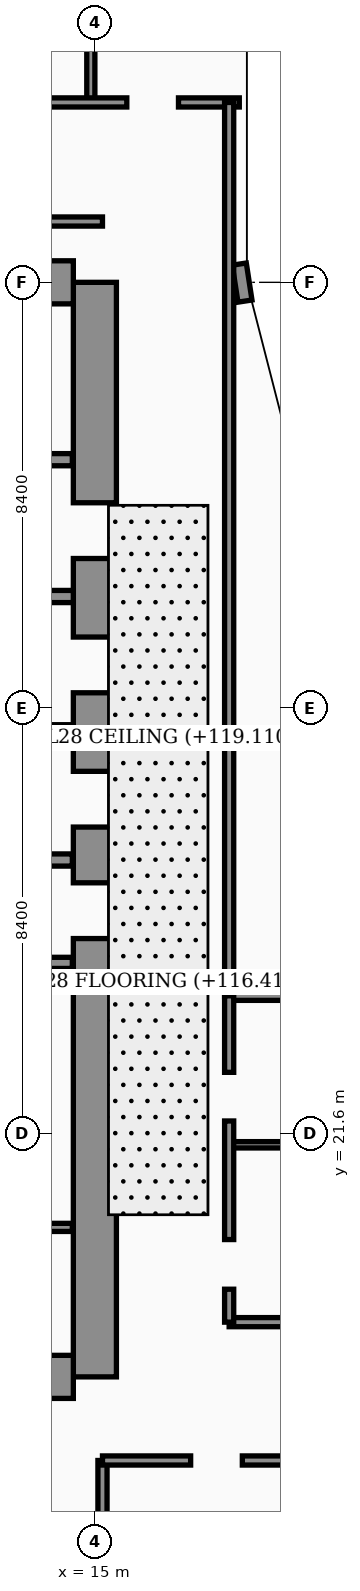
"""IFC4 building model, lengths in metres.
Left out: names, types, materials, properties, quantities, classifications, styles, units other than length and angle.
Written with IfcOpenShell. Run it as: python <this file> out.ifc"""

import sys

from ifc_helpers import new_model, si_unit, direction, frame, frame_2d, origin, place, context, subcontext, project, spatial, rectangle, extrude, element, fill, save


model = new_model("IFC4")
c1 = context("Model", 3, precision=1e-05, world=origin(), true_north=direction((0.0, 1.0)))
c2 = subcontext(c1, "Body", "Model", "MODEL_VIEW")
j1 = project(units=[si_unit("LENGTHUNIT", "METRE"), si_unit("PLANEANGLEUNIT", "RADIAN")], contexts=[c1])
p1 = place(None, origin())
s1 = spatial("IfcSite", under=j1, at=p1, CompositionType="ELEMENT")
p2 = place(p1, origin())
s2 = spatial("IfcBuilding", under=s1, at=p2, CompositionType="ELEMENT")
p3 = place(p2, frame((0.0, 0.0, 116.4)))
s3 = spatial("IfcBuildingStorey", under=s2, at=p3, CompositionType="ELEMENT", Elevation=116.4)
p4 = place(p3, frame((15.0, 16.8, 0.0), z_axis=(0.0, 0.0, 1.0), x_axis=(0.0, 1.0, 0.0)))
e1 = element("IfcWall", 1, at=p4, inside=s3, PredefinedType="SHEAR", context=c2, shape_type="SweptSolid", body=[
    extrude(rectangle(XDim=21.6, YDim=0.85, at=frame_2d((10.8, 0.0))), origin(), (0.0, 0.0, 1.0), 3.56),
])
p5 = place(p4, frame((8.65, 0.0, 0.0)))
e2 = element("IfcOpeningElement", 2, at=p5, cuts=e1, PredefinedType="OPENING", context=c2, shape_type="SweptSolid", body=[
    extrude(rectangle(XDim=1.1, YDim=2.2, at=frame_2d((0.55, 1.1))), frame((0.0, 0.435, 0.0), z_axis=(0.0, -1.0, 0.0), x_axis=(1.0, 0.0, 0.0)), (0.0, 0.0, 1.0), 0.87),
])
p6 = place(p4, frame((10.85, 0.0, 0.0)))
e3 = element("IfcOpeningElement", 3, at=p6, cuts=e1, PredefinedType="OPENING", context=c2, shape_type="SweptSolid", body=[
    extrude(rectangle(XDim=1.1, YDim=2.2, at=frame_2d((0.55, 1.1))), frame((0.0, 0.435, 0.0), z_axis=(0.0, -1.0, 0.0), x_axis=(1.0, 0.0, 0.0)), (0.0, 0.0, 1.0), 0.87),
])
p7 = place(p4, frame((13.5, 0.0, 0.0)))
e4 = element("IfcOpeningElement", 4, at=p7, cuts=e1, PredefinedType="OPENING", context=c2, shape_type="SweptSolid", body=[
    extrude(rectangle(XDim=1.1, YDim=2.2, at=frame_2d((0.55, 1.1))), frame((0.0, 0.435, 0.0), z_axis=(0.0, -1.0, 0.0), x_axis=(1.0, 0.0, 0.0)), (0.0, 0.0, 1.0), 0.87),
])
p8 = place(p4, frame((16.15, 0.0, 0.0)))
e5 = element("IfcOpeningElement", 5, at=p8, cuts=e1, PredefinedType="OPENING", context=c2, shape_type="SweptSolid", body=[
    extrude(rectangle(XDim=1.1, YDim=2.2, at=frame_2d((0.55, 1.1))), frame((0.0, 0.435, 0.0), z_axis=(0.0, -1.0, 0.0), x_axis=(1.0, 0.0, 0.0)), (0.0, 0.0, 1.0), 0.87),
])
for number, where, z_axis, x_axis in (
    (6, (4.625, 38.4, 0.0), (0.0, 0.0, 1.0), (1.0, 0.0, 0.0)),
    (7, (4.625, 16.8, 0.0), (0.0, 0.0, 1.0), (1.0, 0.0, 0.0)),
):
    element("IfcWall", number, at=place(p3, frame(where, z_axis=z_axis, x_axis=x_axis)), inside=s3, PredefinedType="SHEAR", context=c2, shape_type="SweptSolid", body=[
        extrude(rectangle(XDim=9.95, YDim=0.85, at=frame_2d((4.975, 0.0))), origin(), (0.0, 0.0, 1.0), 3.56),
    ])
for number, where, z_axis, x_axis in (
    (8, (12.18, 29.55, 0.0), (0.0, 0.0, 1.0), (1.0, 0.0, 0.0)),
    (9, (12.18, 32.2, 0.0), (0.0, 0.0, 1.0), (1.0, 0.0, 0.0)),
):
    element("IfcWall", number, at=place(p3, frame(where, z_axis=z_axis, x_axis=x_axis)), inside=s3, PredefinedType="SOLIDWALL", context=c2, shape_type="SweptSolid", body=[
        extrude(rectangle(XDim=2.395, YDim=0.24, at=frame_2d((1.198, 0.0))), origin(), (0.0, 0.0, 1.0), 3.56),
    ])
p9 = place(p3, frame((17.962, 38.03, 0.0), z_axis=(0.0, 0.0, 1.0), x_axis=(-0.15141125477, 0.988470855377, 0.0)))
e10 = element("IfcWall", 10, at=p9, inside=s3, PredefinedType="SOLIDWALL", context=c2, shape_type="SweptSolid", body=[
    extrude(rectangle(XDim=0.739, YDim=0.28, at=frame_2d((0.369, 0.0))), origin(), (0.0, 0.0, 1.0), 3.56),
])
p10 = place(p3, frame((9.68, 19.75, 0.0), z_axis=(0.0, 0.0, 1.0), x_axis=(1.0, 0.0, 0.0)))
e11 = element("IfcWall", 11, at=p10, inside=s3, PredefinedType="PARTITIONING", context=c2, shape_type="SweptSolid", body=[
    extrude(rectangle(XDim=4.875, YDim=0.16, at=frame_2d((2.438, 0.0))), origin(), (0.0, 0.0, 1.0), 3.56),
])
p11 = place(p10, frame((1.1, 0.0, 0.0)))
e12 = element("IfcOpeningElement", 12, at=p11, cuts=e11, PredefinedType="OPENING", context=c2, shape_type="SweptSolid", body=[
    extrude(rectangle(XDim=0.98, YDim=2.15, at=frame_2d((0.49, 1.075))), frame((0.0, 0.09, 0.0), z_axis=(0.0, -1.0, 0.0), x_axis=(1.0, 0.0, 0.0)), (0.0, 0.0, 1.0), 0.18),
])
p12 = place(p3, frame((9.68, 24.97, 0.0), z_axis=(0.0, 0.0, 1.0), x_axis=(1.0, 0.0, 0.0)))
e13 = element("IfcWall", 13, at=p12, inside=s3, PredefinedType="SOLIDWALL", context=c2, shape_type="SweptSolid", body=[
    extrude(rectangle(XDim=4.875, YDim=0.22, at=frame_2d((2.438, 0.0))), origin(), (0.0, 0.0, 1.0), 2.84),
])
p13 = place(p12, frame((0.9, 0.0, 0.0)))
e14 = element("IfcOpeningElement", 14, at=p13, cuts=e13, PredefinedType="OPENING", context=c2, shape_type="SweptSolid", body=[
    extrude(rectangle(XDim=0.98, YDim=2.15, at=frame_2d((0.49, 1.075))), frame((0.0, 0.12, 0.0), z_axis=(0.0, -1.0, 0.0), x_axis=(1.0, 0.0, 0.0)), (0.0, 0.0, 1.0), 0.24),
])
p14 = place(p3, frame((12.25, 27.0, 0.0), z_axis=(0.0, 0.0, 1.0), x_axis=(1.0, 0.0, 0.0)))
e15 = element("IfcWall", 15, at=p14, inside=s3, PredefinedType="SOLIDWALL", context=c2, shape_type="SweptSolid", body=[
    extrude(rectangle(XDim=2.305, YDim=0.24, at=frame_2d((1.152, 0.0))), origin(), (0.0, 0.0, 1.0), 3.56),
])
p15 = place(p3, frame((9.66, 34.9, 0.0), z_axis=(0.0, 0.0, 1.0), x_axis=(1.0, 0.0, 0.0)))
e16 = element("IfcWall", 16, at=p15, inside=s3, PredefinedType="SOLIDWALL", context=c2, shape_type="SweptSolid", body=[
    extrude(rectangle(XDim=4.895, YDim=0.24, at=frame_2d((2.448, 0.0))), origin(), (0.0, 0.0, 1.0), 3.56),
])
p16 = place(p3, frame((15.15, 2.44, 0.0), z_axis=(0.0, 0.0, 1.0), x_axis=(0.0, 1.0, 0.0)))
e17 = element("IfcWall", 17, at=p16, inside=s3, PredefinedType="PARTITIONING", context=c2, shape_type="SweptSolid", body=[
    extrude(rectangle(XDim=12.71, YDim=0.18, at=frame_2d((6.355, 0.0))), origin(), (0.0, 0.0, 1.0), 3.04),
])
p17 = place(p3, frame((15.15, 15.15, 0.0), z_axis=(0.0, 0.0, 1.0), x_axis=(1.0, 0.0, 0.0)))
e18 = element("IfcWall", 18, at=p17, inside=s3, PredefinedType="PARTITIONING", context=c2, shape_type="SweptSolid", body=[
    extrude(rectangle(XDim=6.45, YDim=0.18, at=frame_2d((3.225, 0.0))), origin(), (0.0, 0.0, 1.0), 2.49),
])
p18 = place(p17, frame((1.74, 0.0, 0.0)))
e19 = element("IfcOpeningElement", 19, at=p18, cuts=e18, PredefinedType="OPENING", context=c2, shape_type="SweptSolid", body=[
    extrude(rectangle(XDim=1.02, YDim=2.2, at=frame_2d((0.51, 1.1))), frame((0.0, 0.1, 0.0), z_axis=(0.0, -1.0, 0.0), x_axis=(1.0, 0.0, 0.0)), (0.0, 0.0, 1.0), 0.2),
])
p19 = place(p3, frame((14.92, 41.95, 0.0), z_axis=(0.0, 0.0, 1.0), x_axis=(0.0, 1.0, 0.0)))
e20 = element("IfcWall", 20, at=p19, inside=s3, PredefinedType="PARTITIONING", context=c2, shape_type="SweptSolid", body=[
    extrude(rectangle(XDim=5.85, YDim=0.16, at=frame_2d((2.925, 0.0))), origin(), (0.0, 0.0, 1.0), 3.04),
])
p20 = place(p3, frame((0.08, 41.95, 0.0), z_axis=(0.0, 0.0, 1.0), x_axis=(1.0, 0.0, 0.0)))
e21 = element("IfcWall", 21, at=p20, inside=s3, PredefinedType="PARTITIONING", context=c2, shape_type="SweptSolid", body=[
    extrude(rectangle(XDim=17.77, YDim=0.18, at=frame_2d((8.885, 0.0))), origin(), (0.0, 0.0, 1.0), 2.84),
])
p21 = place(p20, frame((0.9, 0.0, 0.0)))
e22 = element("IfcOpeningElement", 22, at=p21, cuts=e21, PredefinedType="OPENING", context=c2, shape_type="SweptSolid", body=[
    extrude(rectangle(XDim=1.02, YDim=2.2, at=frame_2d((0.51, 1.1))), frame((0.0, 0.1, 0.0), z_axis=(0.0, -1.0, 0.0), x_axis=(1.0, 0.0, 0.0)), (0.0, 0.0, 1.0), 0.2),
])
p22 = place(p20, frame((4.57, 0.0, 0.0)))
e23 = element("IfcOpeningElement", 23, at=p22, cuts=e21, PredefinedType="OPENING", context=c2, shape_type="SweptSolid", body=[
    extrude(rectangle(XDim=1.02, YDim=2.2, at=frame_2d((0.51, 1.1))), frame((0.0, 0.1, 0.0), z_axis=(0.0, -1.0, 0.0), x_axis=(1.0, 0.0, 0.0)), (0.0, 0.0, 1.0), 0.2),
])
p23 = place(p20, frame((10.46, 0.0, 0.0)))
e24 = element("IfcOpeningElement", 24, at=p23, cuts=e21, PredefinedType="OPENING", context=c2, shape_type="SweptSolid", body=[
    extrude(rectangle(XDim=1.02, YDim=2.2, at=frame_2d((0.51, 1.1))), frame((0.0, 0.1, 0.0), z_axis=(0.0, -1.0, 0.0), x_axis=(1.0, 0.0, 0.0)), (0.0, 0.0, 1.0), 0.2),
])
p24 = place(p20, frame((15.55, 0.0, 0.0)))
e25 = element("IfcOpeningElement", 25, at=p24, cuts=e21, PredefinedType="OPENING", context=c2, shape_type="SweptSolid", body=[
    extrude(rectangle(XDim=1.02, YDim=2.2, at=frame_2d((0.51, 1.1))), frame((0.0, 0.1, 0.0), z_axis=(0.0, -1.0, 0.0), x_axis=(1.0, 0.0, 0.0)), (0.0, 0.0, 1.0), 0.2),
])
p25 = place(p3, frame((17.65, 24.3, 0.0), z_axis=(0.0, 0.0, 1.0), x_axis=(0.0, 1.0, 0.0)))
e26 = element("IfcWall", 26, at=p25, inside=s3, PredefinedType="PARTITIONING", context=c2, shape_type="SweptSolid", body=[
    extrude(rectangle(XDim=17.65, YDim=0.18, at=frame_2d((8.825, 0.0))), origin(), (0.0, 0.0, 1.0), 2.84),
])
p26 = place(p3, frame((3.755, 39.6, 0.0), z_axis=(0.0, 0.0, 1.0), x_axis=(1.0, 0.0, 0.0)))
e27 = element("IfcWall", 27, at=p26, inside=s3, PredefinedType="PARTITIONING", context=c2, shape_type="SweptSolid", body=[
    extrude(rectangle(XDim=11.395, YDim=0.18, at=frame_2d((5.698, 0.0))), origin(), (0.0, 0.0, 1.0), 2.84),
])
p27 = place(p3, frame((17.65, 17.88, 0.0), z_axis=(0.0, 0.0, 1.0), x_axis=(1.0, 0.0, 0.0)))
e28 = element("IfcWall", 28, at=p27, inside=s3, PredefinedType="PARTITIONING", context=c2, shape_type="SweptSolid", body=[
    extrude(rectangle(XDim=3.9, YDim=0.18, at=frame_2d((1.95, 0.0))), origin(), (0.0, 0.0, 1.0), 3.56),
])
p28 = place(p3, frame((17.65, 21.38, 0.0), z_axis=(0.0, 0.0, 1.0), x_axis=(1.0, 0.0, 0.0)))
e29 = element("IfcWall", 29, at=p28, inside=s3, PredefinedType="PARTITIONING", context=c2, shape_type="SweptSolid", body=[
    extrude(rectangle(XDim=3.9, YDim=0.125, at=frame_2d((1.95, 0.0))), origin(), (0.0, 0.0, 1.0), 3.56),
])
p29 = place(p3, frame((17.65, 24.32, 0.0), z_axis=(0.0, 0.0, 1.0), x_axis=(1.0, 0.0, 0.0)))
e30 = element("IfcWall", 30, at=p29, inside=s3, PredefinedType="PARTITIONING", context=c2, shape_type="SweptSolid", body=[
    extrude(rectangle(XDim=3.95, YDim=0.18, at=frame_2d((1.975, 0.0))), origin(), (0.0, 0.0, 1.0), 3.56),
])
p30 = place(p3, frame((17.65, 17.88, 0.0), z_axis=(0.0, 0.0, 1.0), x_axis=(0.0, 1.0, 0.0)))
e31 = element("IfcWall", 31, at=p30, inside=s3, PredefinedType="PARTITIONING", context=c2, shape_type="SweptSolid", body=[
    extrude(rectangle(XDim=6.44, YDim=0.18, at=frame_2d((3.22, 0.0))), origin(), (0.0, 0.0, 1.0), 3.56),
])
p31 = place(p30, frame((0.65, 0.0, 0.0)))
e32 = element("IfcOpeningElement", 32, at=p31, cuts=e31, PredefinedType="OPENING", context=c2, shape_type="SweptSolid", body=[
    extrude(rectangle(XDim=0.98, YDim=2.15, at=frame_2d((0.49, 1.075))), frame((0.0, 0.1, 0.0), z_axis=(0.0, -1.0, 0.0), x_axis=(1.0, 0.0, 0.0)), (0.0, 0.0, 1.0), 0.2),
])
p32 = place(p30, frame((3.97, 0.0, 0.0)))
e33 = element("IfcOpeningElement", 33, at=p32, cuts=e31, PredefinedType="OPENING", context=c2, shape_type="SweptSolid", body=[
    extrude(rectangle(XDim=0.96, YDim=2.2, at=frame_2d((0.48, 1.1))), frame((0.0, 0.1, 0.0), z_axis=(0.0, -1.0, 0.0), x_axis=(1.0, 0.0, 0.0)), (0.0, 0.0, 1.0), 0.2),
])
p33 = place(p18, origin())
e34 = element("IfcDoor", 34, at=p33, inside=s3, OperationType="SINGLE_SWING_LEFT", PredefinedType="DOOR", context=c2, shape_type="SweptSolid", body=[
    extrude(rectangle(XDim=1.02, YDim=2.2, at=frame_2d((0.51, 1.1))), frame((0.0, 0.025, 0.0), z_axis=(0.0, -1.0, 0.0), x_axis=(1.0, 0.0, 0.0)), (0.0, 0.0, 1.0), 0.05),
])
fill(e19, e34)
p34 = place(p24, origin())
e35 = element("IfcDoor", 35, at=p34, inside=s3, OperationType="SINGLE_SWING_RIGHT", PredefinedType="DOOR", context=c2, shape_type="SweptSolid", body=[
    extrude(rectangle(XDim=1.02, YDim=2.2, at=frame_2d((0.51, 1.1))), frame((0.0, 0.025, 0.0), z_axis=(0.0, -1.0, 0.0), x_axis=(1.0, 0.0, 0.0)), (0.0, 0.0, 1.0), 0.05),
])
fill(e25, e35)
p35 = place(p31, origin())
e36 = element("IfcDoor", 36, at=p35, inside=s3, OperationType="SINGLE_SWING_LEFT", PredefinedType="DOOR", context=c2, shape_type="SweptSolid", body=[
    extrude(rectangle(XDim=0.98, YDim=2.15, at=frame_2d((0.49, 1.075))), frame((0.0, 0.025, 0.0), z_axis=(0.0, -1.0, 0.0), x_axis=(1.0, 0.0, 0.0)), (0.0, 0.0, 1.0), 0.05),
])
fill(e32, e36)
p36 = place(p32, origin())
e37 = element("IfcDoor", 37, at=p36, inside=s3, OperationType="SINGLE_SWING_RIGHT", PredefinedType="DOOR", context=c2, shape_type="SweptSolid", body=[
    extrude(rectangle(XDim=0.96, YDim=2.2, at=frame_2d((0.48, 1.1))), frame((0.0, 0.025, 0.0), z_axis=(0.0, -1.0, 0.0), x_axis=(1.0, 0.0, 0.0)), (0.0, 0.0, 1.0), 0.05),
])
fill(e33, e37)
p37 = place(p5, origin())
e38 = element("IfcDoor", 38, at=p37, inside=s3, OperationType="SINGLE_SWING_LEFT", PredefinedType="DOOR", context=c2, shape_type="SweptSolid", body=[
    extrude(rectangle(XDim=1.1, YDim=2.2, at=frame_2d((0.55, 1.1))), frame((0.0, 0.025, 0.0), z_axis=(0.0, -1.0, 0.0), x_axis=(1.0, 0.0, 0.0)), (0.0, 0.0, 1.0), 0.05),
])
fill(e2, e38)
p38 = place(p6, origin())
e39 = element("IfcDoor", 39, at=p38, inside=s3, OperationType="DOUBLE_DOOR_SLIDING", PredefinedType="DOOR", context=c2, shape_type="SweptSolid", body=[
    extrude(rectangle(XDim=1.1, YDim=2.2, at=frame_2d((0.55, 1.1))), frame((0.0, 0.025, 0.0), z_axis=(0.0, -1.0, 0.0), x_axis=(1.0, 0.0, 0.0)), (0.0, 0.0, 1.0), 0.05),
])
fill(e3, e39)
p39 = place(p7, origin())
e40 = element("IfcDoor", 40, at=p39, inside=s3, OperationType="DOUBLE_DOOR_SLIDING", PredefinedType="DOOR", context=c2, shape_type="SweptSolid", body=[
    extrude(rectangle(XDim=1.1, YDim=2.2, at=frame_2d((0.55, 1.1))), frame((0.0, 0.025, 0.0), z_axis=(0.0, -1.0, 0.0), x_axis=(1.0, 0.0, 0.0)), (0.0, 0.0, 1.0), 0.05),
])
fill(e4, e40)
p40 = place(p8, origin())
e41 = element("IfcDoor", 41, at=p40, inside=s3, OperationType="DOUBLE_DOOR_SLIDING", PredefinedType="DOOR", context=c2, shape_type="SweptSolid", body=[
    extrude(rectangle(XDim=1.1, YDim=2.2, at=frame_2d((0.55, 1.1))), frame((0.0, 0.025, 0.0), z_axis=(0.0, -1.0, 0.0), x_axis=(1.0, 0.0, 0.0)), (0.0, 0.0, 1.0), 0.05),
])
fill(e5, e41)
save(model, sys.argv[1])
